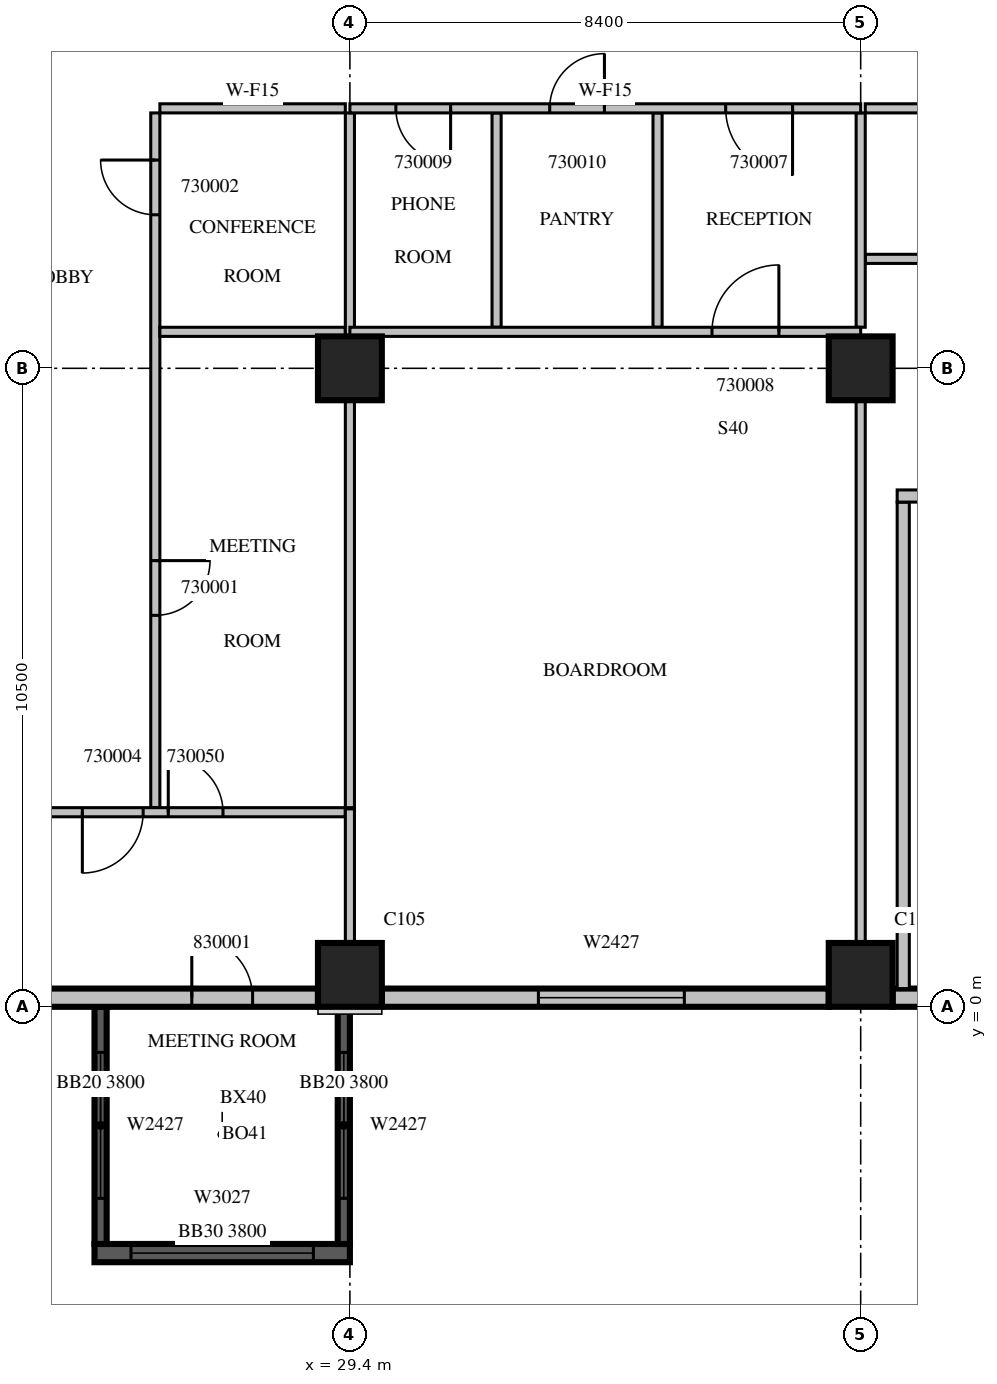
"""IFC4 building model, lengths in metres.
Left out: names, types, materials, properties, quantities, classifications, styles, units other than length and angle.
Written with IfcOpenShell. Run it as: python <this file> out.ifc"""

import sys

from ifc_helpers import new_model, si_unit, direction, frame, frame_2d, origin, origin_2d, place, context, subcontext, project, spatial, rectangle, extrude, source, transform, mapped, element, fill, save


model = new_model("IFC4")
c1 = context("Model", 3, precision=1e-05, world=origin(), true_north=direction((0.0, 1.0)))
c2 = subcontext(c1, "Body", "Model", "MODEL_VIEW")
j1 = project(units=[si_unit("LENGTHUNIT", "METRE"), si_unit("PLANEANGLEUNIT", "RADIAN")], contexts=[c1])
p1 = place(None, origin())
s1 = spatial("IfcSite", under=j1, at=p1, CompositionType="ELEMENT")
p2 = place(p1, origin())
s2 = spatial("IfcBuilding", under=s1, at=p2, CompositionType="ELEMENT")
p3 = place(p2, frame((0.0, 0.0, 137.1)))
s3 = spatial("IfcBuildingStorey", under=s2, at=p3, CompositionType="ELEMENT", Elevation=137.1)
m1 = source(origin(), c2, "Body", "SweptSolid", [
    extrude(rectangle(XDim=1.05, YDim=1.05, at=origin_2d()), origin(), (0.0, 0.0, 1.0), 4.2),
])
for number, where, z_axis, x_axis in (
    (1, (29.4, 0.525, 0.0), (0.0, 0.0, 1.0), (1.0, 0.0, 0.0)),
    (2, (37.8, 0.525, 0.0), (0.0, 0.0, 1.0), (1.0, 0.0, 0.0)),
    (3, (29.4, 10.5, 0.0), (0.0, 0.0, 1.0), (1.0, 0.0, 0.0)),
    (4, (37.8, 10.5, 0.0), (0.0, 0.0, 1.0), (1.0, 0.0, 0.0)),
):
    element("IfcColumn", number, at=place(p3, frame(where, z_axis=z_axis, x_axis=x_axis)), inside=s3, PredefinedType="COLUMN", context=c2, shape_type="MappedRepresentation", body=[
        mapped(m1, transform((0.0, 0.0, 0.0), scale=1.0)),
    ])
m2 = source(origin(), c2, "Body", "SweptSolid", [
    extrude(rectangle(XDim=4.2, YDim=0.3, at=frame_2d((2.1, 0.0))), origin(), (0.0, 0.0, 1.0), 3.8),
])
p4 = place(p3, frame((25.2, -4.05, 0.0), z_axis=(0.0, 0.0, 1.0), x_axis=(1.0, 0.0, 0.0)))
e5 = element("IfcWall", 5, at=p4, inside=s3, PredefinedType="SOLIDWALL", context=c2, shape_type="MappedRepresentation", body=[
    mapped(m2, transform((0.0, 0.0, 0.0), scale=1.0)),
])
m3 = source(origin(), c2, "Body", "SweptSolid", [
    extrude(rectangle(XDim=3.0, YDim=2.7, at=frame_2d((1.5, 1.35))), frame((0.0, 0.16, 0.0), z_axis=(0.0, -1.0, 0.0), x_axis=(1.0, 0.0, 0.0)), (0.0, 0.0, 1.0), 0.32),
])
p5 = place(p4, frame((0.6, 0.0, 0.6)))
e6 = element("IfcOpeningElement", 6, at=p5, cuts=e5, PredefinedType="OPENING", context=c2, shape_type="MappedRepresentation", body=[
    mapped(m3, transform((0.0, 0.0, 0.0), scale=1.0)),
])
m4 = source(origin(), c2, "Body", "SweptSolid", [
    extrude(rectangle(XDim=3.9, YDim=0.2, at=frame_2d((1.95, 0.0))), origin(), (0.0, 0.0, 1.0), 3.8),
])
p6 = place(p3, frame((25.3, 0.0, 0.0), z_axis=(0.0, 0.0, 1.0), x_axis=(0.0, -1.0, 0.0)))
e7 = element("IfcWall", 7, at=p6, inside=s3, PredefinedType="SOLIDWALL", context=c2, shape_type="MappedRepresentation", body=[
    mapped(m4, transform((0.0, 0.0, 0.0), scale=1.0)),
])
m5 = source(origin(), c2, "Body", "SweptSolid", [
    extrude(rectangle(XDim=2.4, YDim=2.7, at=frame_2d((1.2, 1.35))), frame((0.0, 0.11, 0.0), z_axis=(0.0, -1.0, 0.0), x_axis=(1.0, 0.0, 0.0)), (0.0, 0.0, 1.0), 0.22),
])
p7 = place(p6, frame((0.75, 0.0, 0.6)))
e8 = element("IfcOpeningElement", 8, at=p7, cuts=e7, PredefinedType="OPENING", context=c2, shape_type="MappedRepresentation", body=[
    mapped(m5, transform((0.0, 0.0, 0.0), scale=1.0)),
])
p8 = place(p3, frame((29.3, 0.0, 0.0), z_axis=(0.0, 0.0, 1.0), x_axis=(0.0, -1.0, 0.0)))
e9 = element("IfcWall", 9, at=p8, inside=s3, PredefinedType="SOLIDWALL", context=c2, shape_type="MappedRepresentation", body=[
    mapped(m4, transform((0.0, 0.0, 0.0), scale=1.0)),
])
p9 = place(p8, frame((0.75, 0.0, 0.6)))
e10 = element("IfcOpeningElement", 10, at=p9, cuts=e9, PredefinedType="OPENING", context=c2, shape_type="MappedRepresentation", body=[
    mapped(m5, transform((0.0, 0.0, 0.0), scale=1.0)),
])
m6 = source(origin(), c2, "Body", "SweptSolid", [
    extrude(rectangle(XDim=7.35, YDim=0.3, at=frame_2d((3.675, 0.0))), origin(), (0.0, 0.0, 1.0), 3.8),
])
p10 = place(p3, frame((21.525, 0.15, 0.0), z_axis=(0.0, 0.0, 1.0), x_axis=(1.0, 0.0, 0.0)))
e11 = element("IfcWall", 11, at=p10, inside=s3, PredefinedType="STANDARD", context=c2, shape_type="MappedRepresentation", body=[
    mapped(m6, transform((0.0, 0.0, 0.0), scale=1.0)),
])
m7 = source(origin(), c2, "Body", "SweptSolid", [
    extrude(rectangle(XDim=2.4, YDim=2.7, at=frame_2d((1.2, 1.35))), frame((0.0, 0.16, 0.0), z_axis=(0.0, -1.0, 0.0), x_axis=(1.0, 0.0, 0.0)), (0.0, 0.0, 1.0), 0.32),
])
p11 = place(p10, frame((0.375, 0.0, 0.6)))
e12 = element("IfcOpeningElement", 12, at=p11, cuts=e11, PredefinedType="OPENING", context=c2, shape_type="MappedRepresentation", body=[
    mapped(m7, transform((0.0, 0.0, 0.0), scale=1.0)),
])
m8 = source(origin(), c2, "Body", "SweptSolid", [
    extrude(rectangle(XDim=1.0, YDim=2.1, at=frame_2d((0.5, 1.05))), frame((0.0, 0.16, 0.0), z_axis=(0.0, -1.0, 0.0), x_axis=(1.0, 0.0, 0.0)), (0.0, 0.0, 1.0), 0.32),
])
p12 = place(p10, frame((5.275, 0.0, 0.0)))
e13 = element("IfcOpeningElement", 13, at=p12, cuts=e11, PredefinedType="OPENING", context=c2, shape_type="MappedRepresentation", body=[
    mapped(m8, transform((0.0, 0.0, 0.0), scale=1.0)),
])
p13 = place(p3, frame((29.925, 0.15, 0.0), z_axis=(0.0, 0.0, 1.0), x_axis=(1.0, 0.0, 0.0)))
e14 = element("IfcWall", 14, at=p13, inside=s3, PredefinedType="STANDARD", context=c2, shape_type="MappedRepresentation", body=[
    mapped(m6, transform((0.0, 0.0, 0.0), scale=1.0)),
])
p14 = place(p13, frame((2.575, 0.0, 0.6)))
e15 = element("IfcOpeningElement", 15, at=p14, cuts=e14, PredefinedType="OPENING", context=c2, shape_type="MappedRepresentation", body=[
    mapped(m7, transform((0.0, 0.0, 0.0), scale=1.0)),
])
m9 = source(origin(), c2, "Body", "SweptSolid", [
    extrude(rectangle(XDim=1.875, YDim=0.3, at=frame_2d((0.938, 0.0))), origin(), (0.0, 0.0, 1.0), 3.8),
])
p15 = place(p3, frame((38.325, 0.15, 0.0), z_axis=(0.0, 0.0, 1.0), x_axis=(1.0, 0.0, 0.0)))
e16 = element("IfcWall", 16, at=p15, inside=s3, PredefinedType="STANDARD", context=c2, shape_type="MappedRepresentation", body=[
    mapped(m9, transform((0.0, 0.0, 0.0), scale=1.0)),
])
m10 = source(origin(), c2, "Body", "SweptSolid", [
    extrude(rectangle(XDim=8.0, YDim=0.2, at=frame_2d((4.0, 0.0))), origin(), (0.0, 0.0, 1.0), 3.8),
])
p16 = place(p3, frame((38.5, 0.3, 0.0), z_axis=(0.0, 0.0, 1.0), x_axis=(0.0, 1.0, 0.0)))
e17 = element("IfcWall", 17, at=p16, inside=s3, PredefinedType="PARTITIONING", context=c2, shape_type="MappedRepresentation", body=[
    mapped(m10, transform((0.0, 0.0, 0.0), scale=1.0)),
])
m11 = source(origin(), c2, "Body", "SweptSolid", [
    extrude(rectangle(XDim=5.45, YDim=0.2, at=frame_2d((2.725, 0.0))), origin(), (0.0, 0.0, 1.0), 3.8),
])
p17 = place(p3, frame((38.4, 8.4, 0.0), z_axis=(0.0, 0.0, 1.0), x_axis=(1.0, 0.0, 0.0)))
e18 = element("IfcWall", 18, at=p17, inside=s3, PredefinedType="PARTITIONING", context=c2, shape_type="MappedRepresentation", body=[
    mapped(m11, transform((0.0, 0.0, 0.0), scale=1.0)),
])
m12 = source(origin(), c2, "Body", "SweptSolid", [
    extrude(rectangle(XDim=1.2, YDim=2.1, at=frame_2d((0.6, 1.05))), frame((0.0, 0.11, 0.0), z_axis=(0.0, -1.0, 0.0), x_axis=(1.0, 0.0, 0.0)), (0.0, 0.0, 1.0), 0.22),
])
p18 = place(p17, frame((0.4, 0.0, 0.0)))
e19 = element("IfcOpeningElement", 19, at=p18, cuts=e18, PredefinedType="OPENING", context=c2, shape_type="MappedRepresentation", body=[
    mapped(m12, transform((0.0, 0.0, 0.0), scale=1.0)),
])
m13 = source(origin(), c2, "Body", "SweptSolid", [
    extrude(rectangle(XDim=0.9, YDim=2.1, at=frame_2d((0.45, 1.05))), frame((0.0, 0.11, 0.0), z_axis=(0.0, -1.0, 0.0), x_axis=(1.0, 0.0, 0.0)), (0.0, 0.0, 1.0), 0.22),
])
p19 = place(p17, frame((3.25, 0.0, 0.0)))
e20 = element("IfcOpeningElement", 20, at=p19, cuts=e18, PredefinedType="OPENING", context=c2, shape_type="MappedRepresentation", body=[
    mapped(m13, transform((0.0, 0.0, 0.0), scale=1.0)),
])
m14 = source(origin(), c2, "Body", "SweptSolid", [
    extrude(rectangle(XDim=11.425, YDim=0.15, at=frame_2d((5.713, 0.0))), origin(), (0.0, 0.0, 1.0), 3.8),
])
p20 = place(p3, frame((26.2, 14.7, 0.0), z_axis=(0.0, 0.0, 1.0), x_axis=(0.0, -1.0, 0.0)))
e21 = element("IfcWall", 21, at=p20, inside=s3, PredefinedType="PARTITIONING", context=c2, shape_type="MappedRepresentation", body=[
    mapped(m14, transform((0.0, 0.0, 0.0), scale=1.0)),
])
m15 = source(origin(), c2, "Body", "SweptSolid", [
    extrude(rectangle(XDim=0.9, YDim=2.1, at=frame_2d((0.45, 1.05))), frame((0.0, 0.085, 0.0), z_axis=(0.0, -1.0, 0.0), x_axis=(1.0, 0.0, 0.0)), (0.0, 0.0, 1.0), 0.17),
])
p21 = place(p20, frame((7.362, 0.0, 0.0)))
e22 = element("IfcOpeningElement", 22, at=p21, cuts=e21, PredefinedType="OPENING", context=c2, shape_type="MappedRepresentation", body=[
    mapped(m15, transform((0.0, 0.0, 0.0), scale=1.0)),
])
p22 = place(p20, frame((0.775, 0.0, 0.0)))
e23 = element("IfcOpeningElement", 23, at=p22, cuts=e21, PredefinedType="OPENING", context=c2, shape_type="MappedRepresentation", body=[
    mapped(m15, transform((0.0, 0.0, 0.0), scale=1.0)),
])
m16 = source(origin(), c2, "Body", "SweptSolid", [
    extrude(rectangle(XDim=3.05, YDim=0.15, at=frame_2d((1.525, 0.0))), origin(), (0.0, 0.0, 1.0), 3.8),
])
for number, where, z_axis, x_axis in (
    (24, (29.325, 11.1, 0.0), (0.0, 0.0, 1.0), (-1.0, 0.0, 0.0)),
    (25, (29.325, 14.775, 0.0), (0.0, 0.0, 1.0), (-1.0, 0.0, 0.0)),
):
    element("IfcWall", number, at=place(p3, frame(where, z_axis=z_axis, x_axis=x_axis)), inside=s3, PredefinedType="PARTITIONING", context=c2, shape_type="MappedRepresentation", body=[
        mapped(m16, transform((0.0, 0.0, 0.0), scale=1.0)),
    ])
m17 = source(origin(), c2, "Body", "SweptSolid", [
    extrude(rectangle(XDim=6.701, YDim=0.15, at=frame_2d((3.35, 0.0))), origin(), (0.0, 0.0, 1.0), 3.8),
])
p23 = place(p3, frame((29.4, 3.275, 0.0), z_axis=(0.0, 0.0, 1.0), x_axis=(0.0, 1.0, 0.0)))
e26 = element("IfcWall", 26, at=p23, inside=s3, PredefinedType="PARTITIONING", context=c2, shape_type="MappedRepresentation", body=[
    mapped(m17, transform((0.0, 0.0, 0.0), scale=1.0)),
])
m18 = source(origin(), c2, "Body", "SweptSolid", [
    extrude(rectangle(XDim=3.676, YDim=0.15, at=frame_2d((1.838, 0.0))), origin(), (0.0, 0.0, 1.0), 3.8),
])
p24 = place(p3, frame((29.4, 11.024, 0.0), z_axis=(0.0, 0.0, 1.0), x_axis=(0.0, 1.0, 0.0)))
e27 = element("IfcWall", 27, at=p24, inside=s3, PredefinedType="PARTITIONING", context=c2, shape_type="MappedRepresentation", body=[
    mapped(m18, transform((0.0, 0.0, 0.0), scale=1.0)),
])
m19 = source(origin(), c2, "Body", "SweptSolid", [
    extrude(rectangle(XDim=7.325, YDim=0.15, at=frame_2d((3.663, 0.0))), origin(), (0.0, 0.0, 1.0), 3.8),
])
p25 = place(p3, frame((22.0, 3.2, 0.0), z_axis=(0.0, 0.0, 1.0), x_axis=(1.0, 0.0, 0.0)))
e28 = element("IfcWall", 28, at=p25, inside=s3, PredefinedType="PARTITIONING", context=c2, shape_type="MappedRepresentation", body=[
    mapped(m19, transform((0.0, 0.0, 0.0), scale=1.0)),
])
m20 = source(origin(), c2, "Body", "SweptSolid", [
    extrude(rectangle(XDim=1.0, YDim=2.1, at=frame_2d((0.5, 1.05))), frame((0.0, 0.085, 0.0), z_axis=(0.0, -1.0, 0.0), x_axis=(1.0, 0.0, 0.0)), (0.0, 0.0, 1.0), 0.17),
])
p26 = place(p25, frame((3.0, 0.0, 0.0)))
e29 = element("IfcOpeningElement", 29, at=p26, cuts=e28, PredefinedType="OPENING", context=c2, shape_type="MappedRepresentation", body=[
    mapped(m20, transform((0.0, 0.0, 0.0), scale=1.0)),
])
p27 = place(p25, frame((4.413, 0.0, 0.0)))
e30 = element("IfcOpeningElement", 30, at=p27, cuts=e28, PredefinedType="OPENING", context=c2, shape_type="MappedRepresentation", body=[
    mapped(m15, transform((0.0, 0.0, 0.0), scale=1.0)),
])
m21 = source(origin(), c2, "Body", "SweptSolid", [
    extrude(rectangle(XDim=6.45, YDim=0.15, at=frame_2d((3.225, 0.0))), origin(), (0.0, 0.0, 1.0), 3.8),
])
p28 = place(p3, frame((37.875, 12.3, 0.0), z_axis=(0.0, 0.0, 1.0), x_axis=(1.0, 0.0, 0.0)))
e31 = element("IfcWall", 31, at=p28, inside=s3, PredefinedType="PARTITIONING", context=c2, shape_type="MappedRepresentation", body=[
    mapped(m21, transform((0.0, 0.0, 0.0), scale=1.0)),
])
p29 = place(p3, frame((44.325, 14.775, 0.0), z_axis=(0.0, 0.0, 1.0), x_axis=(-1.0, 0.0, 0.0)))
e32 = element("IfcWall", 32, at=p29, inside=s3, PredefinedType="PARTITIONING", context=c2, shape_type="MappedRepresentation", body=[
    mapped(m21, transform((0.0, 0.0, 0.0), scale=1.0)),
])
p30 = place(p29, frame((2.812, 0.0, 0.0)))
e33 = element("IfcOpeningElement", 33, at=p30, cuts=e32, PredefinedType="OPENING", context=c2, shape_type="MappedRepresentation", body=[
    mapped(m15, transform((0.0, 0.0, 0.0), scale=1.0)),
])
m22 = source(origin(), c2, "Body", "SweptSolid", [
    extrude(rectangle(XDim=3.525, YDim=0.15, at=frame_2d((1.762, 0.0))), origin(), (0.0, 0.0, 1.0), 3.8),
])
for number, where, z_axis, x_axis in (
    (34, (31.812, 11.175, 0.0), (0.0, 0.0, 1.0), (0.0, 1.0, 0.0)),
    (35, (34.459, 11.175, 0.0), (0.0, 0.0, 1.0), (0.0, 1.0, 0.0)),
):
    element("IfcWall", number, at=place(p3, frame(where, z_axis=z_axis, x_axis=x_axis)), inside=s3, PredefinedType="PARTITIONING", context=c2, shape_type="MappedRepresentation", body=[
        mapped(m22, transform((0.0, 0.0, 0.0), scale=1.0)),
    ])
m23 = source(origin(), c2, "Body", "SweptSolid", [
    extrude(rectangle(XDim=2.206, YDim=0.15, at=frame_2d((1.103, 0.0))), origin(), (0.0, 0.0, 1.0), 3.8),
])
p31 = place(p3, frame((29.4, 1.049, 0.0), z_axis=(0.0, 0.0, 1.0), x_axis=(0.0, 1.0, 0.0)))
e36 = element("IfcWall", 36, at=p31, inside=s3, PredefinedType="PARTITIONING", context=c2, shape_type="MappedRepresentation", body=[
    mapped(m23, transform((0.0, 0.0, 0.0), scale=1.0)),
])
m24 = source(origin(), c2, "Body", "SweptSolid", [
    extrude(rectangle(XDim=8.927, YDim=0.15, at=frame_2d((4.463, 0.0))), origin(), (0.0, 0.0, 1.0), 3.8),
])
p32 = place(p3, frame((37.8, 1.049, 0.0), z_axis=(0.0, 0.0, 1.0), x_axis=(0.0, 1.0, 0.0)))
e37 = element("IfcWall", 37, at=p32, inside=s3, PredefinedType="PARTITIONING", context=c2, shape_type="MappedRepresentation", body=[
    mapped(m24, transform((0.0, 0.0, 0.0), scale=1.0)),
])
p33 = place(p3, frame((37.8, 11.175, 0.0), z_axis=(0.0, 0.0, 1.0), x_axis=(0.0, 1.0, 0.0)))
e38 = element("IfcWall", 38, at=p33, inside=s3, PredefinedType="PARTITIONING", context=c2, shape_type="MappedRepresentation", body=[
    mapped(m22, transform((0.0, 0.0, 0.0), scale=1.0)),
])
m25 = source(origin(), c2, "Body", "SweptSolid", [
    extrude(rectangle(XDim=8.4, YDim=0.15, at=frame_2d((4.2, 0.0))), origin(), (0.0, 0.0, 1.0), 3.8),
])
p34 = place(p3, frame((37.8, 11.1, 0.0), z_axis=(0.0, 0.0, 1.0), x_axis=(-1.0, 0.0, 0.0)))
e39 = element("IfcWall", 39, at=p34, inside=s3, PredefinedType="PARTITIONING", context=c2, shape_type="MappedRepresentation", body=[
    mapped(m25, transform((0.0, 0.0, 0.0), scale=1.0)),
])
m26 = source(origin(), c2, "Body", "SweptSolid", [
    extrude(rectangle(XDim=1.1, YDim=2.1, at=frame_2d((0.55, 1.05))), frame((0.0, 0.085, 0.0), z_axis=(0.0, -1.0, 0.0), x_axis=(1.0, 0.0, 0.0)), (0.0, 0.0, 1.0), 0.17),
])
p35 = place(p34, frame((1.345, 0.0, 0.0)))
e40 = element("IfcOpeningElement", 40, at=p35, cuts=e39, PredefinedType="OPENING", context=c2, shape_type="MappedRepresentation", body=[
    mapped(m26, transform((0.0, 0.0, 0.0), scale=1.0)),
])
p36 = place(p3, frame((37.8, 14.775, 0.0), z_axis=(0.0, 0.0, 1.0), x_axis=(-1.0, 0.0, 0.0)))
e41 = element("IfcWall", 41, at=p36, inside=s3, PredefinedType="PARTITIONING", context=c2, shape_type="MappedRepresentation", body=[
    mapped(m25, transform((0.0, 0.0, 0.0), scale=1.0)),
])
p37 = place(p36, frame((1.12, 0.0, 0.0)))
e42 = element("IfcOpeningElement", 42, at=p37, cuts=e41, PredefinedType="OPENING", context=c2, shape_type="MappedRepresentation", body=[
    mapped(m26, transform((0.0, 0.0, 0.0), scale=1.0)),
])
p38 = place(p36, frame((6.744, 0.0, 0.0)))
e43 = element("IfcOpeningElement", 43, at=p38, cuts=e41, PredefinedType="OPENING", context=c2, shape_type="MappedRepresentation", body=[
    mapped(m15, transform((0.0, 0.0, 0.0), scale=1.0)),
])
p39 = place(p36, frame((4.214, 0.0, 0.0)))
e44 = element("IfcOpeningElement", 44, at=p39, cuts=e41, PredefinedType="OPENING", context=c2, shape_type="MappedRepresentation", body=[
    mapped(m15, transform((0.0, 0.0, 0.0), scale=1.0)),
])
m27 = source(origin(), c2, "Body", "SweptSolid", [
    extrude(rectangle(XDim=3.0, YDim=2.7, at=frame_2d((1.5, 1.35))), frame((0.0, 0.03, 0.0), z_axis=(0.0, -1.0, 0.0), x_axis=(1.0, 0.0, 0.0)), (0.0, 0.0, 1.0), 0.06),
])
p40 = place(p5, origin())
e45 = element("IfcWindow", 45, at=p40, inside=s3, PartitioningType="SINGLE_PANEL", PredefinedType="WINDOW", context=c2, shape_type="MappedRepresentation", body=[
    mapped(m27, transform((0.0, 0.0, 0.0), scale=1.0)),
])
fill(e6, e45)
m28 = source(origin(), c2, "Body", "SweptSolid", [
    extrude(rectangle(XDim=2.4, YDim=2.7, at=frame_2d((1.2, 1.35))), frame((0.0, 0.03, 0.0), z_axis=(0.0, -1.0, 0.0), x_axis=(1.0, 0.0, 0.0)), (0.0, 0.0, 1.0), 0.06),
])
p41 = place(p7, origin())
e46 = element("IfcWindow", 46, at=p41, inside=s3, PartitioningType="SINGLE_PANEL", PredefinedType="WINDOW", context=c2, shape_type="MappedRepresentation", body=[
    mapped(m28, transform((0.0, 0.0, 0.0), scale=1.0)),
])
fill(e8, e46)
p42 = place(p9, origin())
e47 = element("IfcWindow", 47, at=p42, inside=s3, PartitioningType="SINGLE_PANEL", PredefinedType="WINDOW", context=c2, shape_type="MappedRepresentation", body=[
    mapped(m28, transform((0.0, 0.0, 0.0), scale=1.0)),
])
fill(e10, e47)
p43 = place(p14, origin())
e48 = element("IfcWindow", 48, at=p43, inside=s3, PartitioningType="SINGLE_PANEL", PredefinedType="WINDOW", context=c2, shape_type="MappedRepresentation", body=[
    mapped(m28, transform((0.0, 0.0, 0.0), scale=1.0)),
])
fill(e15, e48)
m29 = source(origin(), c2, "Body", "SweptSolid", [
    extrude(rectangle(XDim=0.9, YDim=2.1, at=frame_2d((0.45, 1.05))), frame((0.0, 0.025, 0.0), z_axis=(0.0, -1.0, 0.0), x_axis=(1.0, 0.0, 0.0)), (0.0, 0.0, 1.0), 0.05),
])
p44 = place(p21, origin())
e49 = element("IfcDoor", 49, at=p44, inside=s3, OperationType="SINGLE_SWING_LEFT", PredefinedType="DOOR", context=c2, shape_type="MappedRepresentation", body=[
    mapped(m29, transform((0.0, 0.0, 0.0), scale=1.0)),
])
fill(e22, e49)
p45 = place(p22, origin())
e50 = element("IfcDoor", 50, at=p45, inside=s3, OperationType="SINGLE_SWING_RIGHT", PredefinedType="DOOR", context=c2, shape_type="MappedRepresentation", body=[
    mapped(m29, transform((0.0, 0.0, 0.0), scale=1.0)),
])
fill(e23, e50)
m30 = source(origin(), c2, "Body", "SweptSolid", [
    extrude(rectangle(XDim=1.0, YDim=2.1, at=frame_2d((0.5, 1.05))), frame((0.0, 0.025, 0.0), z_axis=(0.0, -1.0, 0.0), x_axis=(1.0, 0.0, 0.0)), (0.0, 0.0, 1.0), 0.05),
])
p46 = place(p26, origin())
e51 = element("IfcDoor", 51, at=p46, inside=s3, OperationType="SINGLE_SWING_RIGHT", PredefinedType="DOOR", context=c2, shape_type="MappedRepresentation", body=[
    mapped(m30, transform((0.0, 0.0, 0.0), scale=1.0)),
])
fill(e29, e51)
m31 = source(origin(), c2, "Body", "SweptSolid", [
    extrude(rectangle(XDim=1.1, YDim=2.1, at=frame_2d((0.55, 1.05))), frame((0.0, 0.025, 0.0), z_axis=(0.0, -1.0, 0.0), x_axis=(1.0, 0.0, 0.0)), (0.0, 0.0, 1.0), 0.05),
])
p47 = place(p37, origin())
e52 = element("IfcDoor", 52, at=p47, inside=s3, OperationType="SINGLE_SWING_LEFT", PredefinedType="DOOR", context=c2, shape_type="MappedRepresentation", body=[
    mapped(m31, transform((0.0, 0.0, 0.0), scale=1.0)),
])
fill(e42, e52)
p48 = place(p35, origin())
e53 = element("IfcDoor", 53, at=p48, inside=s3, OperationType="SINGLE_SWING_RIGHT", PredefinedType="DOOR", context=c2, shape_type="MappedRepresentation", body=[
    mapped(m31, transform((0.0, 0.0, 0.0), scale=1.0)),
])
fill(e40, e53)
p49 = place(p38, origin())
e54 = element("IfcDoor", 54, at=p49, inside=s3, OperationType="SINGLE_SWING_LEFT", PredefinedType="DOOR", context=c2, shape_type="MappedRepresentation", body=[
    mapped(m29, transform((0.0, 0.0, 0.0), scale=1.0)),
])
fill(e43, e54)
p50 = place(p39, origin())
e55 = element("IfcDoor", 55, at=p50, inside=s3, OperationType="SINGLE_SWING_RIGHT", PredefinedType="DOOR", context=c2, shape_type="MappedRepresentation", body=[
    mapped(m29, transform((0.0, 0.0, 0.0), scale=1.0)),
])
fill(e44, e55)
p51 = place(p27, origin())
e56 = element("IfcDoor", 56, at=p51, inside=s3, OperationType="SINGLE_SWING_LEFT", PredefinedType="DOOR", context=c2, shape_type="MappedRepresentation", body=[
    mapped(m29, transform((0.0, 0.0, 0.0), scale=1.0)),
])
fill(e30, e56)
p52 = place(p12, origin())
e57 = element("IfcDoor", 57, at=p52, inside=s3, OperationType="SINGLE_SWING_LEFT", PredefinedType="DOOR", context=c2, shape_type="MappedRepresentation", body=[
    mapped(m30, transform((0.0, 0.0, 0.0), scale=1.0)),
])
fill(e13, e57)
save(model, sys.argv[1])
